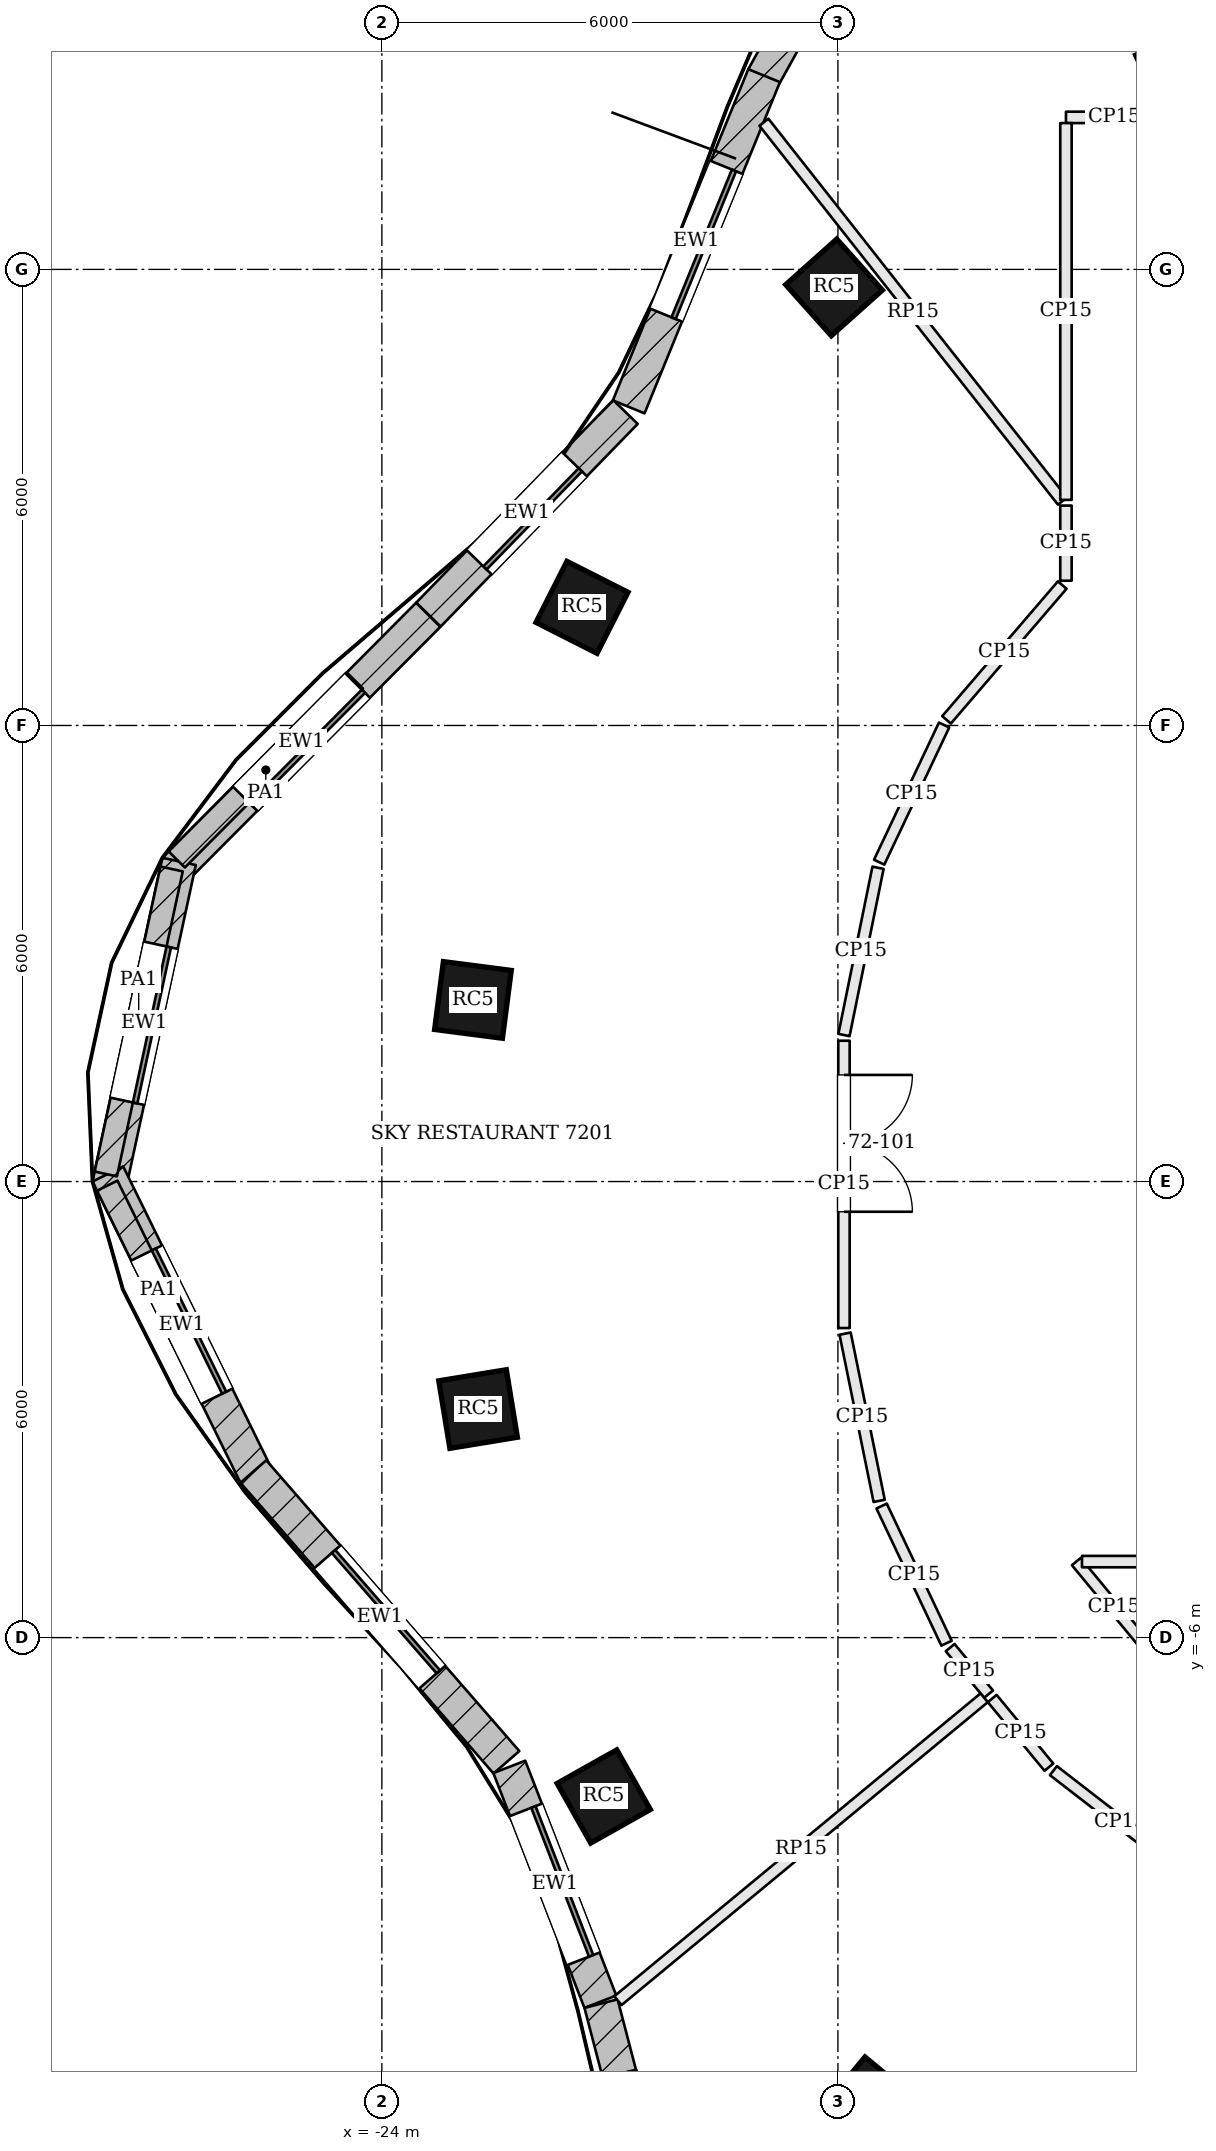
"""IFC4 building model, lengths in metres.
Left out: names, types, materials, properties, quantities, classifications, styles, units other than length and angle.
Written with IfcOpenShell. Run it as: python <this file> out.ifc"""

import sys

from ifc_helpers import new_model, si_unit, direction, frame, frame_2d, origin, origin_2d, place, context, subcontext, project, spatial, rectangle, extrude, element, fill, save


model = new_model("IFC4")
c1 = context("Model", 3, precision=1e-05, world=origin(), true_north=direction((0.0, 1.0)))
c2 = subcontext(c1, "Body", "Model", "MODEL_VIEW")
j1 = project(units=[si_unit("LENGTHUNIT", "METRE"), si_unit("PLANEANGLEUNIT", "RADIAN")], contexts=[c1])
p1 = place(None, origin())
s1 = spatial("IfcSite", under=j1, at=p1, CompositionType="ELEMENT")
p2 = place(p1, origin())
s2 = spatial("IfcBuilding", under=s1, at=p2, CompositionType="ELEMENT")
p3 = place(p2, frame((0.0, 0.0, 292.2)))
s3 = spatial("IfcBuildingStorey", under=s2, at=p3, CompositionType="ELEMENT", Elevation=292.2)
for number, where, z_axis, x_axis in (
    (1, (-13.487, 14.596, 0.0), (0.0, 0.0, 1.0), (-0.91, -0.415, 0.0)),
    (2, (-18.051, 11.763, 0.0), (0.0, 0.0, 1.0), (-0.746, -0.666, 0.0)),
    (3, (-21.367, 7.554, 0.0), (0.0, 0.0, 1.0), (-0.452, -0.892, 0.0)),
    (4, (-22.802, 2.389, 0.0), (0.0, 0.0, 1.0), (-0.129, -0.992, 0.0)),
    (5, (-22.734, -2.993, 0.0), (0.0, 0.0, 1.0), (0.162, -0.987, 0.0)),
    (6, (-21.081, -8.09, 0.0), (0.0, 0.0, 1.0), (0.49, -0.872, 0.0)),
    (7, (-17.584, -12.151, 0.0), (0.0, 0.0, 1.0), (0.771, -0.637, 0.0)),
):
    element("IfcColumn", number, at=place(p3, frame(where, z_axis=z_axis, x_axis=x_axis)), inside=s3, PredefinedType="COLUMN", context=c2, shape_type="SweptSolid", body=[
        extrude(rectangle(XDim=0.9, YDim=0.9, at=origin_2d()), origin(), (0.0, 0.0, 1.0), 3.9),
    ])
p4 = place(p3, frame((-17.359, 17.447, 0.0), z_axis=(0.0, 0.0, 1.0), x_axis=(-0.485618126214, -0.874171056197, 0.0)))
e8 = element("IfcWall", 8, at=p4, inside=s3, PredefinedType="SOLIDWALL", context=c2, shape_type="SweptSolid", body=[
    extrude(rectangle(XDim=3.343, YDim=0.45, at=frame_2d((1.671, 0.0))), origin(), (0.0, 0.0, 1.0), 3.7),
])
p5 = place(p4, frame((0.621, 0.0, 0.9)))
e9 = element("IfcOpeningElement", 9, at=p5, cuts=e8, PredefinedType="OPENING", context=c2, shape_type="SweptSolid", body=[
    extrude(rectangle(XDim=2.1, YDim=2.3, at=frame_2d((1.05, 1.15))), frame((0.0, 0.235, 0.0), z_axis=(0.0, -1.0, 0.0), x_axis=(1.0, 0.0, 0.0)), (0.0, 0.0, 1.0), 0.47),
])
p6 = place(p3, frame((-18.971, 14.549, 0.0), z_axis=(0.0, 0.0, 1.0), x_axis=(-0.378434936431, -0.925627894398, 0.0)))
e10 = element("IfcWall", 10, at=p6, inside=s3, PredefinedType="SOLIDWALL", context=c2, shape_type="SweptSolid", body=[
    extrude(rectangle(XDim=4.708, YDim=0.45, at=frame_2d((2.354, 0.0))), origin(), (0.0, 0.0, 1.0), 3.7),
])
p7 = place(p6, frame((1.304, 0.0, 0.9)))
e11 = element("IfcOpeningElement", 11, at=p7, cuts=e10, PredefinedType="OPENING", context=c2, shape_type="SweptSolid", body=[
    extrude(rectangle(XDim=2.1, YDim=2.3, at=frame_2d((1.05, 1.15))), frame((0.0, 0.235, 0.0), z_axis=(0.0, -1.0, 0.0), x_axis=(1.0, 0.0, 0.0)), (0.0, 0.0, 1.0), 0.47),
])
p8 = place(p3, frame((-20.796, 10.124, 0.0), z_axis=(0.0, 0.0, 1.0), x_axis=(-0.697121527554, -0.716952980203, 0.0)))
e12 = element("IfcWall", 12, at=p8, inside=s3, PredefinedType="SOLIDWALL", context=c2, shape_type="SweptSolid", body=[
    extrude(rectangle(XDim=3.718, YDim=0.45, at=frame_2d((1.859, 0.0))), origin(), (0.0, 0.0, 1.0), 3.7),
])
p9 = place(p8, frame((0.959, 0.0, 0.9)))
e13 = element("IfcOpeningElement", 13, at=p9, cuts=e12, PredefinedType="OPENING", context=c2, shape_type="SweptSolid", body=[
    extrude(rectangle(XDim=1.8, YDim=2.3, at=frame_2d((0.9, 1.15))), frame((0.0, 0.235, 0.0), z_axis=(0.0, -1.0, 0.0), x_axis=(1.0, 0.0, 0.0)), (0.0, 0.0, 1.0), 0.47),
])
p10 = place(p3, frame((-23.39, 7.456, 0.0), z_axis=(0.0, 0.0, 1.0), x_axis=(-0.705349231702, -0.708859973011, 0.0)))
e14 = element("IfcWall", 14, at=p10, inside=s3, PredefinedType="SOLIDWALL", context=c2, shape_type="SweptSolid", body=[
    extrude(rectangle(XDim=4.729, YDim=0.45, at=frame_2d((2.364, 0.0))), origin(), (0.0, 0.0, 1.0), 3.7),
])
p11 = place(p10, frame((1.314, 0.0, 0.9)))
e15 = element("IfcOpeningElement", 15, at=p11, cuts=e14, PredefinedType="OPENING", context=c2, shape_type="SweptSolid", body=[
    extrude(rectangle(XDim=2.1, YDim=2.3, at=frame_2d((1.05, 1.15))), frame((0.0, 0.235, 0.0), z_axis=(0.0, -1.0, 0.0), x_axis=(1.0, 0.0, 0.0)), (0.0, 0.0, 1.0), 0.47),
])
p12 = place(p3, frame((-26.668, 4.211, 0.0), z_axis=(0.0, 0.0, 1.0), x_axis=(-0.210910311825, -0.977505417052, 0.0)))
e16 = element("IfcWall", 16, at=p12, inside=s3, PredefinedType="SOLIDWALL", context=c2, shape_type="SweptSolid", body=[
    extrude(rectangle(XDim=4.357, YDim=0.45, at=frame_2d((2.178, 0.0))), origin(), (0.0, 0.0, 1.0), 3.7),
])
p13 = place(p12, frame((1.128, 0.0, 0.9)))
e17 = element("IfcOpeningElement", 17, at=p13, cuts=e16, PredefinedType="OPENING", context=c2, shape_type="SweptSolid", body=[
    extrude(rectangle(XDim=2.1, YDim=2.3, at=frame_2d((1.05, 1.15))), frame((0.0, 0.235, 0.0), z_axis=(0.0, -1.0, 0.0), x_axis=(1.0, 0.0, 0.0)), (0.0, 0.0, 1.0), 0.47),
])
p14 = place(p3, frame((-27.605, 0.099, 0.0), z_axis=(0.0, 0.0, 1.0), x_axis=(0.440876526139, -0.897567762734, 0.0)))
e18 = element("IfcWall", 18, at=p14, inside=s3, PredefinedType="SOLIDWALL", context=c2, shape_type="SweptSolid", body=[
    extrude(rectangle(XDim=4.415, YDim=0.45, at=frame_2d((2.208, 0.0))), origin(), (0.0, 0.0, 1.0), 3.7),
])
p15 = place(p14, frame((1.158, 0.0, 0.9)))
e19 = element("IfcOpeningElement", 19, at=p15, cuts=e18, PredefinedType="OPENING", context=c2, shape_type="SweptSolid", body=[
    extrude(rectangle(XDim=2.1, YDim=2.3, at=frame_2d((1.05, 1.15))), frame((0.0, 0.235, 0.0), z_axis=(0.0, -1.0, 0.0), x_axis=(1.0, 0.0, 0.0)), (0.0, 0.0, 1.0), 0.47),
])
p16 = place(p3, frame((-25.691, -3.815, 0.0), z_axis=(0.0, 0.0, 1.0), x_axis=(0.656552883353, -0.754279995334, 0.0)))
e20 = element("IfcWall", 20, at=p16, inside=s3, PredefinedType="SOLIDWALL", context=c2, shape_type="SweptSolid", body=[
    extrude(rectangle(XDim=5.071, YDim=0.45, at=frame_2d((2.536, 0.0))), origin(), (0.0, 0.0, 1.0), 3.7),
])
p17 = place(p16, frame((1.486, 0.0, 0.9)))
e21 = element("IfcOpeningElement", 21, at=p17, cuts=e20, PredefinedType="OPENING", context=c2, shape_type="SweptSolid", body=[
    extrude(rectangle(XDim=2.1, YDim=2.3, at=frame_2d((1.05, 1.15))), frame((0.0, 0.235, 0.0), z_axis=(0.0, -1.0, 0.0), x_axis=(1.0, 0.0, 0.0)), (0.0, 0.0, 1.0), 0.47),
])
p18 = place(p3, frame((-22.323, -7.701, 0.0), z_axis=(0.0, 0.0, 1.0), x_axis=(0.361550075906, -0.932352692178, 0.0)))
e22 = element("IfcWall", 22, at=p18, inside=s3, PredefinedType="SOLIDWALL", context=c2, shape_type="SweptSolid", body=[
    extrude(rectangle(XDim=3.313, YDim=0.45, at=frame_2d((1.657, 0.0))), origin(), (0.0, 0.0, 1.0), 3.7),
])
p19 = place(p18, frame((0.607, 0.0, 0.9)))
e23 = element("IfcOpeningElement", 23, at=p19, cuts=e22, PredefinedType="OPENING", context=c2, shape_type="SweptSolid", body=[
    extrude(rectangle(XDim=2.1, YDim=2.3, at=frame_2d((1.05, 1.15))), frame((0.0, 0.235, 0.0), z_axis=(0.0, -1.0, 0.0), x_axis=(1.0, 0.0, 0.0)), (0.0, 0.0, 1.0), 0.47),
])
p20 = place(p3, frame((-21.117, -10.815, 0.0), z_axis=(0.0, 0.0, 1.0), x_axis=(0.253065392985, -0.967449175344, 0.0)))
e24 = element("IfcWall", 24, at=p20, inside=s3, PredefinedType="SOLIDWALL", context=c2, shape_type="SweptSolid", body=[
    extrude(rectangle(XDim=4.015, YDim=0.45, at=frame_2d((2.008, 0.0))), origin(), (0.0, 0.0, 1.0), 3.7),
])
p21 = place(p20, frame((0.958, 0.0, 0.9)))
e25 = element("IfcOpeningElement", 25, at=p21, cuts=e24, PredefinedType="OPENING", context=c2, shape_type="SweptSolid", body=[
    extrude(rectangle(XDim=2.1, YDim=2.3, at=frame_2d((1.05, 1.15))), frame((0.0, 0.235, 0.0), z_axis=(0.0, -1.0, 0.0), x_axis=(1.0, 0.0, 0.0)), (0.0, 0.0, 1.0), 0.47),
])
p22 = place(p3, frame((-24.355, 6.592, 3.9), z_axis=(0.0, 0.0, 1.0), x_axis=(-0.705340861985, -0.708868301178, 0.0)))
e26 = element("IfcWall", 26, at=p22, inside=s3, PredefinedType="PARAPET", context=c2, shape_type="SweptSolid", body=[
    extrude(rectangle(XDim=3.322, YDim=0.3, at=frame_2d((1.661, 0.0))), origin(), (0.0, 0.0, 1.0), 1.1),
])
p23 = place(p3, frame((-26.766, 4.112, 3.9), z_axis=(0.0, 0.0, 1.0), x_axis=(-0.210962679137, -0.977494116612, 0.0)))
e27 = element("IfcWall", 27, at=p23, inside=s3, PredefinedType="PARAPET", context=c2, shape_type="SweptSolid", body=[
    extrude(rectangle(XDim=4.105, YDim=0.3, at=frame_2d((2.052, 0.0))), origin(), (0.0, 0.0, 1.0), 1.1),
])
p24 = place(p3, frame((-27.613, -0.054, 3.9), z_axis=(0.0, 0.0, 1.0), x_axis=(0.440943372438, -0.897534925394, 0.0)))
e28 = element("IfcWall", 28, at=p24, inside=s3, PredefinedType="PARAPET", context=c2, shape_type="SweptSolid", body=[
    extrude(rectangle(XDim=3.058, YDim=0.3, at=frame_2d((1.529, 0.0))), origin(), (0.0, 0.0, 1.0), 1.1),
])
p25 = place(p3, frame((-15.0, 8.893, 0.0), z_axis=(0.0, 0.0, 1.0), x_axis=(0.0, -1.0, 0.0)))
e29 = element("IfcWall", 29, at=p25, inside=s3, PredefinedType="PARTITIONING", context=c2, shape_type="SweptSolid", body=[
    extrude(rectangle(XDim=0.989, YDim=0.15, at=frame_2d((0.494, 0.0))), origin(), (0.0, 0.0, 1.0), 3.198),
])
p26 = place(p3, frame((-15.049, 7.847, 0.0), z_axis=(0.0, 0.0, 1.0), x_axis=(-0.651264357687, -0.758850931611, 0.0)))
e30 = element("IfcWall", 30, at=p26, inside=s3, PredefinedType="PARTITIONING", context=c2, shape_type="SweptSolid", body=[
    extrude(rectangle(XDim=2.337, YDim=0.15, at=frame_2d((1.169, 0.0))), origin(), (0.0, 0.0, 1.0), 3.198),
])
p27 = place(p3, frame((-16.603, 6.006, 0.0), z_axis=(0.0, 0.0, 1.0), x_axis=(-0.427839289523, -0.903854823708, 0.0)))
e31 = element("IfcWall", 31, at=p27, inside=s3, PredefinedType="PARTITIONING", context=c2, shape_type="SweptSolid", body=[
    extrude(rectangle(XDim=1.997, YDim=0.15, at=frame_2d((0.998, 0.0))), origin(), (0.0, 0.0, 1.0), 3.198),
])
p28 = place(p3, frame((-17.472, 4.128, 0.0), z_axis=(0.0, 0.0, 1.0), x_axis=(-0.199502025364, -0.979897413955, 0.0)))
e32 = element("IfcWall", 32, at=p28, inside=s3, PredefinedType="PARTITIONING", context=c2, shape_type="SweptSolid", body=[
    extrude(rectangle(XDim=2.246, YDim=0.15, at=frame_2d((1.123, 0.0))), origin(), (0.0, 0.0, 1.0), 3.198),
])
p29 = place(p3, frame((-17.92, 1.853, 0.0), z_axis=(0.0, 0.0, 1.0), x_axis=(0.0, -1.0, 0.0)))
e33 = element("IfcWall", 33, at=p29, inside=s3, PredefinedType="PARTITIONING", context=c2, shape_type="SweptSolid", body=[
    extrude(rectangle(XDim=3.78, YDim=0.15, at=frame_2d((1.89, 0.0))), origin(), (0.0, 0.0, 1.0), 3.198),
])
p30 = place(p29, frame((0.45, 0.0, 0.0)))
e34 = element("IfcOpeningElement", 34, at=p30, cuts=e33, PredefinedType="OPENING", context=c2, shape_type="SweptSolid", body=[
    extrude(rectangle(XDim=1.8, YDim=2.1, at=frame_2d((0.9, 1.05))), frame((0.0, 0.085, 0.0), z_axis=(0.0, -1.0, 0.0), x_axis=(1.0, 0.0, 0.0)), (0.0, 0.0, 1.0), 0.17),
])
p31 = place(p3, frame((-17.906, -2.001, 0.0), z_axis=(0.0, 0.0, 1.0), x_axis=(0.199502025364, -0.979897413955, 0.0)))
e35 = element("IfcWall", 35, at=p31, inside=s3, PredefinedType="PARTITIONING", context=c2, shape_type="SweptSolid", body=[
    extrude(rectangle(XDim=2.246, YDim=0.15, at=frame_2d((1.123, 0.0))), origin(), (0.0, 0.0, 1.0), 3.198),
])
p32 = place(p3, frame((-17.425, -4.269, 0.0), z_axis=(0.0, 0.0, 1.0), x_axis=(0.427886578366, -0.90383243804, 0.0)))
e36 = element("IfcWall", 36, at=p32, inside=s3, PredefinedType="PARTITIONING", context=c2, shape_type="SweptSolid", body=[
    extrude(rectangle(XDim=1.996, YDim=0.15, at=frame_2d((0.998, 0.0))), origin(), (0.0, 0.0, 1.0), 3.198),
])
p33 = place(p3, frame((-16.523, -6.132, 0.0), z_axis=(0.0, 0.0, 1.0), x_axis=(0.636698606768, -0.771112757085, 0.0)))
e37 = element("IfcWall", 37, at=p33, inside=s3, PredefinedType="PARTITIONING", context=c2, shape_type="SweptSolid", body=[
    extrude(rectangle(XDim=0.794, YDim=0.15, at=frame_2d((0.397, 0.0))), origin(), (0.0, 0.0, 1.0), 3.198),
])
p34 = place(p3, frame((-18.974, 13.937, 0.0), z_axis=(0.0, 0.0, 1.0), x_axis=(0.618916821117, -0.785456535104, 0.0)))
e38 = element("IfcWall", 38, at=p34, inside=s3, PredefinedType="PARTITIONING", context=c2, shape_type="SweptSolid", body=[
    extrude(rectangle(XDim=6.346, YDim=0.15, at=frame_2d((3.173, 0.0))), origin(), (0.0, 0.0, 1.0), 3.234),
])
p35 = place(p3, frame((-20.894, -10.777, 0.0), z_axis=(0.0, 0.0, 1.0), x_axis=(0.770606553, 0.637311180251, 0.0)))
e39 = element("IfcWall", 39, at=p35, inside=s3, PredefinedType="PARTITIONING", context=c2, shape_type="SweptSolid", body=[
    extrude(rectangle(XDim=6.253, YDim=0.15, at=frame_2d((3.126, 0.0))), origin(), (0.0, 0.0, 1.0), 3.234),
])
p36 = place(p3, frame((-15.97, -6.802, 0.0), z_axis=(0.0, 0.0, 1.0), x_axis=(0.636897609689, -0.770948399552, 0.0)))
e40 = element("IfcWall", 40, at=p36, inside=s3, PredefinedType="PARTITIONING", context=c2, shape_type="SweptSolid", body=[
    extrude(rectangle(XDim=1.171, YDim=0.15, at=frame_2d((0.585, 0.0))), origin(), (0.0, 0.0, 1.0), 3.198),
])
p37 = place(p3, frame((-15.165, -7.75, 0.0), z_axis=(0.0, 0.0, 1.0), x_axis=(0.790917548929, -0.611922732701, 0.0)))
e41 = element("IfcWall", 41, at=p37, inside=s3, PredefinedType="PARTITIONING", context=c2, shape_type="SweptSolid", body=[
    extrude(rectangle(XDim=2.222, YDim=0.15, at=frame_2d((1.111, 0.0))), origin(), (0.0, 0.0, 1.0), 3.198),
])
p38 = place(p3, frame((-13.732, 14.0, 0.0), z_axis=(0.0, 0.0, 1.0), x_axis=(-1.0, 0.0, 0.0)))
e42 = element("IfcWall", 42, at=p38, inside=s3, PredefinedType="PARTITIONING", context=c2, shape_type="SweptSolid", body=[
    extrude(rectangle(XDim=1.268, YDim=0.15, at=frame_2d((0.634, 0.0))), origin(), (0.0, 0.0, 1.0), 3.198),
])
p39 = place(p3, frame((-15.0, 13.925, 0.0), z_axis=(0.0, 0.0, 1.0), x_axis=(0.0, -1.0, 0.0)))
e43 = element("IfcWall", 43, at=p39, inside=s3, PredefinedType="PARTITIONING", context=c2, shape_type="SweptSolid", body=[
    extrude(rectangle(XDim=4.957, YDim=0.15, at=frame_2d((2.479, 0.0))), origin(), (0.0, 0.0, 1.0), 3.198),
])
p40 = place(p3, frame((-13.872, -6.201, 0.0), z_axis=(0.0, 0.0, 1.0), x_axis=(-0.636832838855, 0.771001903601, 0.0)))
e44 = element("IfcWall", 44, at=p40, inside=s3, PredefinedType="PARTITIONING", context=c2, shape_type="SweptSolid", body=[
    extrude(rectangle(XDim=1.558, YDim=0.15, at=frame_2d((0.779, 0.0))), origin(), (0.0, 0.0, 1.0), 3.198),
])
p41 = place(p3, frame((-14.789, -5.0, 0.0), z_axis=(0.0, 0.0, 1.0), x_axis=(1.0, 0.0, 0.0)))
e45 = element("IfcWall", 45, at=p41, inside=s3, PredefinedType="PARTITIONING", context=c2, shape_type="SweptSolid", body=[
    extrude(rectangle(XDim=29.562, YDim=0.15, at=frame_2d((14.781, 0.0))), origin(), (0.0, 0.0, 1.0), 3.198),
])
p42 = place(p41, frame((3.857, 0.0, 0.0)))
e46 = element("IfcOpeningElement", 46, at=p42, cuts=e45, PredefinedType="OPENING", context=c2, shape_type="SweptSolid", body=[
    extrude(rectangle(XDim=1.0, YDim=2.4, at=frame_2d((0.5, 1.2))), frame((0.0, 0.085, 0.0), z_axis=(0.0, -1.0, 0.0), x_axis=(1.0, 0.0, 0.0)), (0.0, 0.0, 1.0), 0.17),
])
p43 = place(p41, frame((14.289, 0.0, 0.0)))
e47 = element("IfcOpeningElement", 47, at=p43, cuts=e45, PredefinedType="OPENING", context=c2, shape_type="SweptSolid", body=[
    extrude(rectangle(XDim=1.0, YDim=2.1, at=frame_2d((0.5, 1.05))), frame((0.0, 0.085, 0.0), z_axis=(0.0, -1.0, 0.0), x_axis=(1.0, 0.0, 0.0)), (0.0, 0.0, 1.0), 0.17),
])
p44 = place(p41, frame((24.713, 0.0, 0.0)))
e48 = element("IfcOpeningElement", 48, at=p44, cuts=e45, PredefinedType="OPENING", context=c2, shape_type="SweptSolid", body=[
    extrude(rectangle(XDim=1.0, YDim=2.4, at=frame_2d((0.5, 1.2))), frame((0.0, 0.085, 0.0), z_axis=(0.0, -1.0, 0.0), x_axis=(1.0, 0.0, 0.0)), (0.0, 0.0, 1.0), 0.17),
])
p45 = place(p7, origin())
e49 = element("IfcWindow", 49, at=p45, inside=s3, PartitioningType="SINGLE_PANEL", PredefinedType="WINDOW", context=c2, shape_type="SweptSolid", body=[
    extrude(rectangle(XDim=2.1, YDim=2.3, at=frame_2d((1.05, 1.15))), frame((0.0, 0.135, 0.0), z_axis=(0.0, -1.0, 0.0), x_axis=(1.0, 0.0, 0.0)), (0.0, 0.0, 1.0), 0.06),
])
fill(e11, e49)
p46 = place(p9, origin())
e50 = element("IfcWindow", 50, at=p46, inside=s3, PartitioningType="SINGLE_PANEL", PredefinedType="WINDOW", context=c2, shape_type="SweptSolid", body=[
    extrude(rectangle(XDim=1.8, YDim=2.3, at=frame_2d((0.9, 1.15))), frame((0.0, 0.135, 0.0), z_axis=(0.0, -1.0, 0.0), x_axis=(1.0, 0.0, 0.0)), (0.0, 0.0, 1.0), 0.06),
])
fill(e13, e50)
p47 = place(p11, origin())
e51 = element("IfcWindow", 51, at=p47, inside=s3, PartitioningType="SINGLE_PANEL", PredefinedType="WINDOW", context=c2, shape_type="SweptSolid", body=[
    extrude(rectangle(XDim=2.1, YDim=2.3, at=frame_2d((1.05, 1.15))), frame((0.0, 0.135, 0.0), z_axis=(0.0, -1.0, 0.0), x_axis=(1.0, 0.0, 0.0)), (0.0, 0.0, 1.0), 0.06),
])
fill(e15, e51)
p48 = place(p13, origin())
e52 = element("IfcWindow", 52, at=p48, inside=s3, PartitioningType="SINGLE_PANEL", PredefinedType="WINDOW", context=c2, shape_type="SweptSolid", body=[
    extrude(rectangle(XDim=2.1, YDim=2.3, at=frame_2d((1.05, 1.15))), frame((0.0, 0.135, 0.0), z_axis=(0.0, -1.0, 0.0), x_axis=(1.0, 0.0, 0.0)), (0.0, 0.0, 1.0), 0.06),
])
fill(e17, e52)
p49 = place(p15, origin())
e53 = element("IfcWindow", 53, at=p49, inside=s3, PartitioningType="SINGLE_PANEL", PredefinedType="WINDOW", context=c2, shape_type="SweptSolid", body=[
    extrude(rectangle(XDim=2.1, YDim=2.3, at=frame_2d((1.05, 1.15))), frame((0.0, 0.135, 0.0), z_axis=(0.0, -1.0, 0.0), x_axis=(1.0, 0.0, 0.0)), (0.0, 0.0, 1.0), 0.06),
])
fill(e19, e53)
p50 = place(p17, origin())
e54 = element("IfcWindow", 54, at=p50, inside=s3, PartitioningType="SINGLE_PANEL", PredefinedType="WINDOW", context=c2, shape_type="SweptSolid", body=[
    extrude(rectangle(XDim=2.1, YDim=2.3, at=frame_2d((1.05, 1.15))), frame((0.0, 0.135, 0.0), z_axis=(0.0, -1.0, 0.0), x_axis=(1.0, 0.0, 0.0)), (0.0, 0.0, 1.0), 0.06),
])
fill(e21, e54)
p51 = place(p19, origin())
e55 = element("IfcWindow", 55, at=p51, inside=s3, PartitioningType="SINGLE_PANEL", PredefinedType="WINDOW", context=c2, shape_type="SweptSolid", body=[
    extrude(rectangle(XDim=2.1, YDim=2.3, at=frame_2d((1.05, 1.15))), frame((0.0, 0.135, 0.0), z_axis=(0.0, -1.0, 0.0), x_axis=(1.0, 0.0, 0.0)), (0.0, 0.0, 1.0), 0.06),
])
fill(e23, e55)
p52 = place(p30, origin())
e56 = element("IfcDoor", 56, at=p52, inside=s3, OperationType="DOUBLE_DOOR_SINGLE_SWING", PredefinedType="DOOR", context=c2, shape_type="SweptSolid", body=[
    extrude(rectangle(XDim=1.8, YDim=2.1, at=frame_2d((0.9, 1.05))), frame((0.0, 0.025, 0.0), z_axis=(0.0, -1.0, 0.0), x_axis=(1.0, 0.0, 0.0)), (0.0, 0.0, 1.0), 0.05),
])
fill(e34, e56)
save(model, sys.argv[1])
